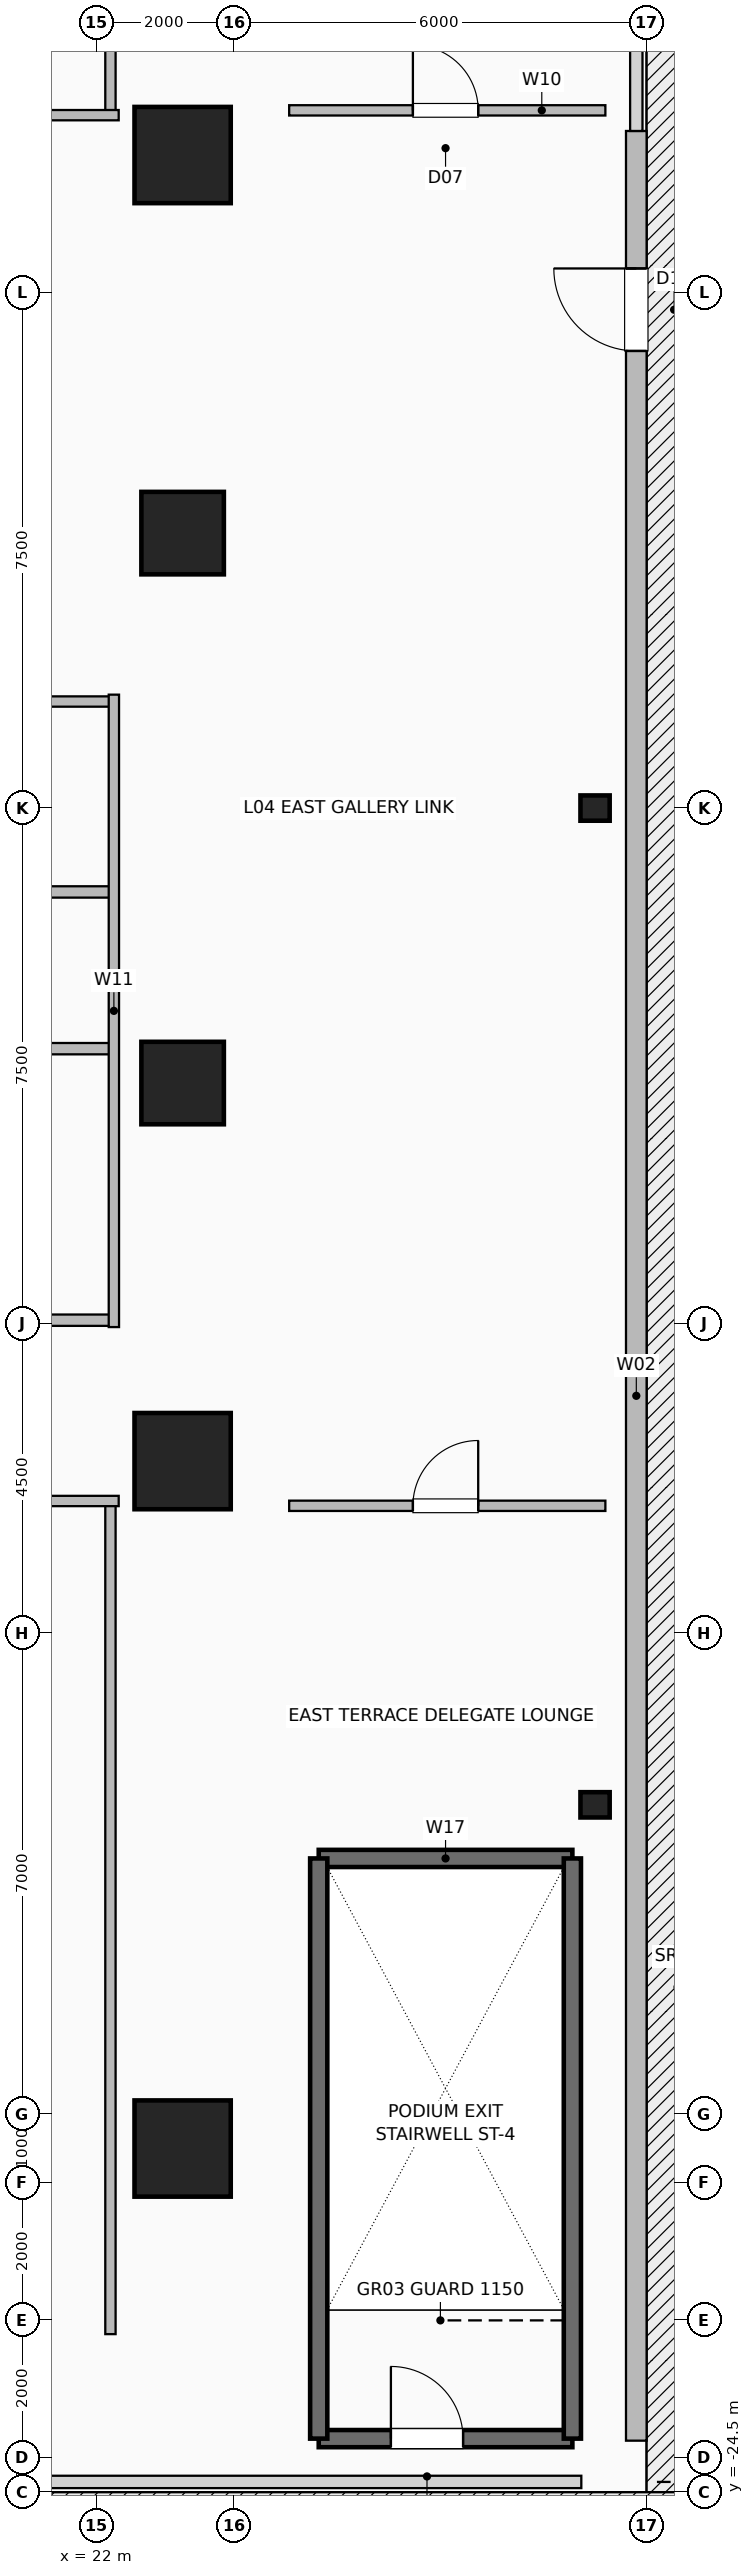
"""IFC4 building model, lengths in metres.
Left out: names, types, materials, properties, quantities, classifications, styles, units other than length and angle.
Written with IfcOpenShell. Run it as: python <this file> out.ifc"""

import sys

from ifc_helpers import new_model, si_unit, direction, frame, frame_2d, origin, origin_2d, place, context, subcontext, project, spatial, rectangle, hollow_rectangle, i_section, extrude, element, fill, save


model = new_model("IFC4")
c1 = context("Model", 3, precision=1e-05, world=origin(), true_north=direction((0.0, 1.0)))
c2 = subcontext(c1, "Body", "Model", "MODEL_VIEW")
j1 = project(units=[si_unit("LENGTHUNIT", "METRE"), si_unit("PLANEANGLEUNIT", "RADIAN")], contexts=[c1])
p1 = place(None, origin())
s1 = spatial("IfcSite", under=j1, at=p1, CompositionType="ELEMENT")
p2 = place(p1, origin())
s2 = spatial("IfcBuilding", under=s1, at=p2, CompositionType="ELEMENT")
p3 = place(p2, frame((0.0, 0.0, 21.6)))
s3 = spatial("IfcBuildingStorey", under=s2, at=p3, CompositionType="ELEMENT", Elevation=21.6)
p4 = place(p3, frame((23.25, -19.5, 0.0), z_axis=(0.0, 0.0, 1.0), x_axis=(1.0, 0.0, 0.0)))
e1 = element("IfcColumn", 1, at=p4, inside=s3, PredefinedType="COLUMN", context=c2, shape_type="SweptSolid", body=[
    extrude(hollow_rectangle(XDim=1.4, YDim=1.4, WallThickness=0.06, at=origin_2d()), origin(), (0.0, 0.0, 1.0), 5.4),
])
for number, where, z_axis, x_axis in (
    (2, (23.25, -9.5, 0.0), (0.0, 0.0, 1.0), (1.0, 0.0, 0.0)),
    (3, (23.25, 9.5, 0.0), (0.0, 0.0, 1.0), (1.0, 0.0, 0.0)),
):
    element("IfcColumn", number, at=place(p3, frame(where, z_axis=z_axis, x_axis=x_axis)), inside=s3, PredefinedType="COLUMN", context=c2, shape_type="SweptSolid", body=[
        extrude(hollow_rectangle(XDim=1.4, YDim=1.4, WallThickness=0.06, at=origin_2d()), origin(), (0.0, 0.0, 1.0), 5.0),
    ])
for number, where, z_axis, x_axis in (
    (4, (23.25, -4.0, -0.4), (0.0, 0.0, 1.0), (1.0, 0.0, 0.0)),
    (5, (23.25, 4.0, -0.4), (0.0, 0.0, 1.0), (1.0, 0.0, 0.0)),
):
    element("IfcColumn", number, at=place(p3, frame(where, z_axis=z_axis, x_axis=x_axis)), inside=s3, PredefinedType="COLUMN", context=c2, shape_type="SweptSolid", body=[
        extrude(hollow_rectangle(XDim=1.2, YDim=1.2, WallThickness=0.055, at=origin_2d()), origin(), (0.0, 0.0, 1.0), 5.8),
    ])
for number, where, z_axis, x_axis in (
    (6, (29.25, -14.5, 0.0), (0.0, 0.0, 1.0), (1.0, 0.0, 0.0)),
    (7, (29.25, 0.0, 0.0), (0.0, 0.0, 1.0), (1.0, 0.0, 0.0)),
):
    element("IfcColumn", number, at=place(p3, frame(where, z_axis=z_axis, x_axis=x_axis)), inside=s3, PredefinedType="COLUMN", context=c2, shape_type="SweptSolid", body=[
        extrude(i_section(OverallWidth=0.368, OverallDepth=0.425, WebThickness=0.03, FlangeThickness=0.048, FilletRadius=0.02, at=origin_2d()), origin(), (0.0, 0.0, 1.0), 5.0),
    ])
p5 = place(p3, frame((29.85, -23.75, 0.0), z_axis=(0.0, 0.0, 1.0), x_axis=(0.0, 1.0, 0.0)))
e8 = element("IfcWall", 8, at=p5, inside=s3, PredefinedType="SOLIDWALL", context=c2, shape_type="SweptSolid", body=[
    extrude(rectangle(XDim=33.6, YDim=0.3, at=frame_2d((16.8, 0.0))), origin(), (0.0, 0.0, 1.0), 5.0),
])
p6 = place(p5, frame((30.4, 0.0, 0.0)))
e9 = element("IfcOpeningElement", 9, at=p6, cuts=e8, PredefinedType="OPENING", context=c2, shape_type="SweptSolid", body=[
    extrude(rectangle(XDim=1.2, YDim=2.25, at=frame_2d((0.6, 1.125))), frame((0.0, 0.16, 0.0), z_axis=(0.0, -1.0, 0.0), x_axis=(1.0, 0.0, 0.0)), (0.0, 0.0, 1.0), 0.32),
])
p7 = place(p3, frame((25.23, -23.72, 0.0), z_axis=(0.0, 0.0, 1.0), x_axis=(1.0, 0.0, 0.0)))
e10 = element("IfcWall", 10, at=p7, inside=s3, PredefinedType="SHEAR", context=c2, shape_type="SweptSolid", body=[
    extrude(rectangle(XDim=3.69, YDim=0.25, at=frame_2d((1.845, 0.0))), origin(), (0.0, 0.0, 1.0), 5.0),
])
p8 = place(p7, frame((1.05, 0.0, 0.0)))
e11 = element("IfcOpeningElement", 11, at=p8, cuts=e10, PredefinedType="OPENING", context=c2, shape_type="SweptSolid", body=[
    extrude(rectangle(XDim=1.05, YDim=2.08, at=frame_2d((0.525, 1.04))), frame((0.0, 0.135, 0.0), z_axis=(0.0, -1.0, 0.0), x_axis=(1.0, 0.0, 0.0)), (0.0, 0.0, 1.0), 0.27),
])
p9 = place(p3, frame((25.23, -15.28, 0.0), z_axis=(0.0, 0.0, 1.0), x_axis=(1.0, 0.0, 0.0)))
e12 = element("IfcWall", 12, at=p9, inside=s3, PredefinedType="SHEAR", context=c2, shape_type="SweptSolid", body=[
    extrude(rectangle(XDim=3.69, YDim=0.25, at=frame_2d((1.845, 0.0))), origin(), (0.0, 0.0, 1.0), 5.0),
])
for number, where, z_axis, x_axis in (
    (13, (25.23, -23.72, 0.0), (0.0, 0.0, 1.0), (0.0, 1.0, 0.0)),
    (14, (28.92, -23.72, 0.0), (0.0, 0.0, 1.0), (0.0, 1.0, 0.0)),
):
    element("IfcWall", number, at=place(p3, frame(where, z_axis=z_axis, x_axis=x_axis)), inside=s3, PredefinedType="SHEAR", context=c2, shape_type="SweptSolid", body=[
        extrude(rectangle(XDim=8.44, YDim=0.25, at=frame_2d((4.22, 0.0))), origin(), (0.0, 0.0, 1.0), 5.0),
    ])
p10 = place(p3, frame((22.2, -22.2, 0.0), z_axis=(0.0, 0.0, 1.0), x_axis=(0.0, 1.0, 0.0)))
e15 = element("IfcWall", 15, at=p10, inside=s3, PredefinedType="PARTITIONING", context=c2, shape_type="SweptSolid", body=[
    extrude(rectangle(XDim=12.12, YDim=0.15, at=frame_2d((6.06, 0.0))), origin(), (0.0, 0.0, 1.0), 5.0),
])
p11 = place(p3, frame((-22.32, -10.08, 0.0), z_axis=(0.0, 0.0, 1.0), x_axis=(1.0, 0.0, 0.0)))
e16 = element("IfcWall", 16, at=p11, inside=s3, PredefinedType="PARTITIONING", context=c2, shape_type="SweptSolid", body=[
    extrude(rectangle(XDim=44.64, YDim=0.15, at=frame_2d((22.32, 0.0))), origin(), (0.0, 0.0, 1.0), 5.0),
])
p12 = place(p11, frame((8.07, 0.0, 0.0)))
e17 = element("IfcOpeningElement", 17, at=p12, cuts=e16, PredefinedType="OPENING", context=c2, shape_type="SweptSolid", body=[
    extrude(rectangle(XDim=1.8, YDim=2.08, at=frame_2d((0.9, 1.04))), frame((0.0, 0.085, 0.0), z_axis=(0.0, -1.0, 0.0), x_axis=(1.0, 0.0, 0.0)), (0.0, 0.0, 1.0), 0.17),
])
p13 = place(p11, frame((22.42, 0.0, 0.0)))
e18 = element("IfcOpeningElement", 18, at=p13, cuts=e16, PredefinedType="OPENING", context=c2, shape_type="SweptSolid", body=[
    extrude(rectangle(XDim=1.8, YDim=2.08, at=frame_2d((0.9, 1.04))), frame((0.0, 0.085, 0.0), z_axis=(0.0, -1.0, 0.0), x_axis=(1.0, 0.0, 0.0)), (0.0, 0.0, 1.0), 0.17),
])
p14 = place(p11, frame((35.77, 0.0, 0.0)))
e19 = element("IfcOpeningElement", 19, at=p14, cuts=e16, PredefinedType="OPENING", context=c2, shape_type="SweptSolid", body=[
    extrude(rectangle(XDim=1.8, YDim=2.08, at=frame_2d((0.9, 1.04))), frame((0.0, 0.085, 0.0), z_axis=(0.0, -1.0, 0.0), x_axis=(1.0, 0.0, 0.0)), (0.0, 0.0, 1.0), 0.17),
])
p15 = place(p3, frame((22.2, 10.08, 0.0), z_axis=(0.0, 0.0, 1.0), x_axis=(0.0, 1.0, 0.0)))
e20 = element("IfcWall", 20, at=p15, inside=s3, PredefinedType="PARTITIONING", context=c2, shape_type="SweptSolid", body=[
    extrude(rectangle(XDim=12.12, YDim=0.15, at=frame_2d((6.06, 0.0))), origin(), (0.0, 0.0, 1.0), 5.0),
])
p16 = place(p3, frame((-22.32, 10.08, 0.0), z_axis=(0.0, 0.0, 1.0), x_axis=(1.0, 0.0, 0.0)))
e21 = element("IfcWall", 21, at=p16, inside=s3, PredefinedType="PARTITIONING", context=c2, shape_type="SweptSolid", body=[
    extrude(rectangle(XDim=44.64, YDim=0.15, at=frame_2d((22.32, 0.0))), origin(), (0.0, 0.0, 1.0), 5.0),
])
p17 = place(p16, frame((8.32, 0.0, 0.0)))
e22 = element("IfcOpeningElement", 22, at=p17, cuts=e21, PredefinedType="OPENING", context=c2, shape_type="SweptSolid", body=[
    extrude(rectangle(XDim=1.8, YDim=2.08, at=frame_2d((0.9, 1.04))), frame((0.0, 0.085, 0.0), z_axis=(0.0, -1.0, 0.0), x_axis=(1.0, 0.0, 0.0)), (0.0, 0.0, 1.0), 0.17),
])
p18 = place(p16, frame((23.345, 0.0, 0.0)))
e23 = element("IfcOpeningElement", 23, at=p18, cuts=e21, PredefinedType="OPENING", context=c2, shape_type="SweptSolid", body=[
    extrude(rectangle(XDim=0.95, YDim=2.06, at=frame_2d((0.475, 1.03))), frame((0.0, 0.085, 0.0), z_axis=(0.0, -1.0, 0.0), x_axis=(1.0, 0.0, 0.0)), (0.0, 0.0, 1.0), 0.17),
])
p19 = place(p16, frame((36.02, 0.0, 0.0)))
e24 = element("IfcOpeningElement", 24, at=p19, cuts=e21, PredefinedType="OPENING", context=c2, shape_type="SweptSolid", body=[
    extrude(rectangle(XDim=1.8, YDim=2.08, at=frame_2d((0.9, 1.04))), frame((0.0, 0.085, 0.0), z_axis=(0.0, -1.0, 0.0), x_axis=(1.0, 0.0, 0.0)), (0.0, 0.0, 1.0), 0.17),
])
for number, where, z_axis, x_axis in (
    (25, (10.08, -1.22, 0.0), (0.0, 0.0, 1.0), (1.0, 0.0, 0.0)),
    (26, (10.08, -7.45, 0.0), (0.0, 0.0, 1.0), (1.0, 0.0, 0.0)),
    (27, (10.08, -3.5, 0.0), (0.0, 0.0, 1.0), (1.0, 0.0, 0.0)),
):
    element("IfcWall", number, at=place(p3, frame(where, z_axis=z_axis, x_axis=x_axis)), inside=s3, PredefinedType="PLUMBINGWALL", context=c2, shape_type="SweptSolid", body=[
        extrude(rectangle(XDim=12.17, YDim=0.165, at=frame_2d((6.085, 0.0))), origin(), (0.0, 0.0, 1.0), 5.0),
    ])
p20 = place(p3, frame((10.08, 1.55, 0.0), z_axis=(0.0, 0.0, 1.0), x_axis=(1.0, 0.0, 0.0)))
e28 = element("IfcWall", 28, at=p20, inside=s3, PredefinedType="PARTITIONING", context=c2, shape_type="SweptSolid", body=[
    extrude(rectangle(XDim=12.17, YDim=0.15, at=frame_2d((6.085, 0.0))), origin(), (0.0, 0.0, 1.0), 5.0),
])
p21 = place(p3, frame((24.8, -10.15, 0.0), z_axis=(0.0, 0.0, 1.0), x_axis=(1.0, 0.0, 0.0)))
e29 = element("IfcWall", 29, at=p21, inside=s3, PredefinedType="PARTITIONING", context=c2, shape_type="SweptSolid", body=[
    extrude(rectangle(XDim=4.6, YDim=0.15, at=frame_2d((2.3, 0.0))), origin(), (0.0, 0.0, 1.0), 5.0),
])
p22 = place(p21, frame((1.8, 0.0, 0.0)))
e30 = element("IfcOpeningElement", 30, at=p22, cuts=e29, PredefinedType="OPENING", context=c2, shape_type="SweptSolid", body=[
    extrude(rectangle(XDim=0.95, YDim=2.06, at=frame_2d((0.475, 1.03))), frame((0.0, 0.085, 0.0), z_axis=(0.0, -1.0, 0.0), x_axis=(1.0, 0.0, 0.0)), (0.0, 0.0, 1.0), 0.17),
])
p23 = place(p3, frame((24.8, 10.15, 0.0), z_axis=(0.0, 0.0, 1.0), x_axis=(1.0, 0.0, 0.0)))
e31 = element("IfcWall", 31, at=p23, inside=s3, PredefinedType="PARTITIONING", context=c2, shape_type="SweptSolid", body=[
    extrude(rectangle(XDim=4.6, YDim=0.15, at=frame_2d((2.3, 0.0))), origin(), (0.0, 0.0, 1.0), 5.0),
])
p24 = place(p23, frame((1.8, 0.0, 0.0)))
e32 = element("IfcOpeningElement", 32, at=p24, cuts=e31, PredefinedType="OPENING", context=c2, shape_type="SweptSolid", body=[
    extrude(rectangle(XDim=0.95, YDim=2.06, at=frame_2d((0.475, 1.03))), frame((0.0, 0.085, 0.0), z_axis=(0.0, -1.0, 0.0), x_axis=(1.0, 0.0, 0.0)), (0.0, 0.0, 1.0), 0.17),
])
p25 = place(p3, frame((22.25, -7.55, 0.0), z_axis=(0.0, 0.0, 1.0), x_axis=(0.0, 1.0, 0.0)))
e33 = element("IfcWall", 33, at=p25, inside=s3, PredefinedType="PARTITIONING", context=c2, shape_type="SweptSolid", body=[
    extrude(rectangle(XDim=9.2, YDim=0.15, at=frame_2d((4.6, 0.0))), origin(), (0.0, 0.0, 1.0), 5.0),
])
p26 = place(p6, origin())
e34 = element("IfcDoor", 34, at=p26, inside=s3, OperationType="SINGLE_SWING_RIGHT", PredefinedType="DOOR", context=c2, shape_type="SweptSolid", body=[
    extrude(rectangle(XDim=1.2, YDim=2.25, at=frame_2d((0.6, 1.125))), frame((0.0, 0.025, 0.0), z_axis=(0.0, -1.0, 0.0), x_axis=(1.0, 0.0, 0.0)), (0.0, 0.0, 1.0), 0.05),
])
fill(e9, e34)
p27 = place(p8, origin())
e35 = element("IfcDoor", 35, at=p27, inside=s3, OperationType="SINGLE_SWING_LEFT", PredefinedType="DOOR", context=c2, shape_type="SweptSolid", body=[
    extrude(rectangle(XDim=1.05, YDim=2.08, at=frame_2d((0.525, 1.04))), frame((0.0, 0.025, 0.0), z_axis=(0.0, -1.0, 0.0), x_axis=(1.0, 0.0, 0.0)), (0.0, 0.0, 1.0), 0.05),
])
fill(e11, e35)
p28 = place(p22, origin())
e36 = element("IfcDoor", 36, at=p28, inside=s3, OperationType="SINGLE_SWING_RIGHT", PredefinedType="DOOR", context=c2, shape_type="SweptSolid", body=[
    extrude(rectangle(XDim=0.95, YDim=2.06, at=frame_2d((0.475, 1.03))), frame((0.0, 0.025, 0.0), z_axis=(0.0, -1.0, 0.0), x_axis=(1.0, 0.0, 0.0)), (0.0, 0.0, 1.0), 0.05),
])
fill(e30, e36)
p29 = place(p24, origin())
e37 = element("IfcDoor", 37, at=p29, inside=s3, OperationType="SINGLE_SWING_LEFT", PredefinedType="DOOR", context=c2, shape_type="SweptSolid", body=[
    extrude(rectangle(XDim=0.95, YDim=2.06, at=frame_2d((0.475, 1.03))), frame((0.0, 0.025, 0.0), z_axis=(0.0, -1.0, 0.0), x_axis=(1.0, 0.0, 0.0)), (0.0, 0.0, 1.0), 0.05),
])
fill(e32, e37)
save(model, sys.argv[1])
